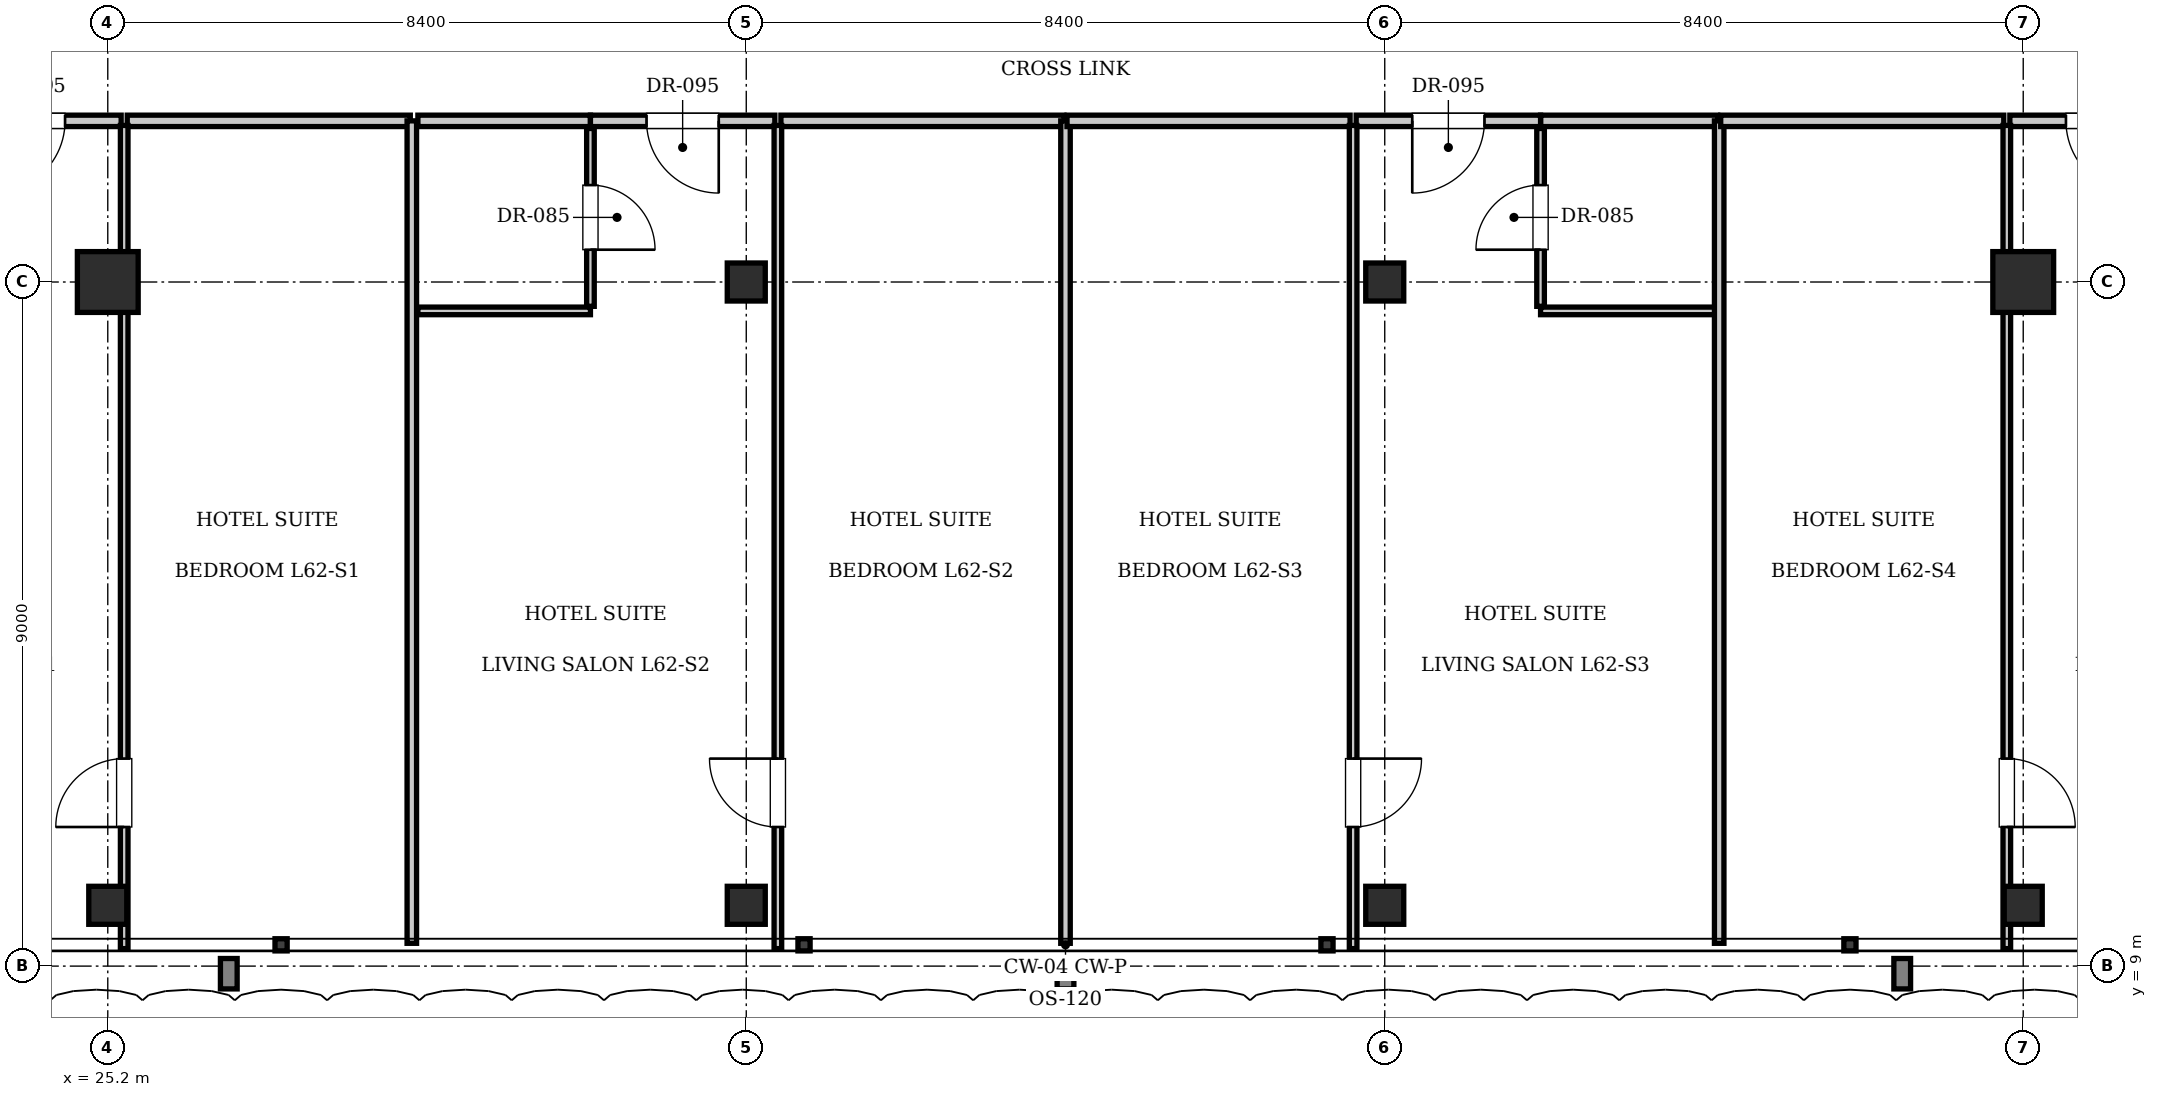
"""IFC4 building model, lengths in metres.
Left out: names, types, materials, properties, quantities, classifications, styles, units other than length and angle.
Written with IfcOpenShell. Run it as: python <this file> out.ifc"""

import sys

from ifc_helpers import new_model, si_unit, direction, frame, frame_2d, origin, origin_2d, place, context, subcontext, project, spatial, rectangle, i_section, extrude, element, fill, save


model = new_model("IFC4")
c1 = context("Model", 3, precision=1e-05, world=origin(), true_north=direction((0.0, 1.0)))
c2 = subcontext(c1, "Body", "Model", "MODEL_VIEW")
j1 = project(units=[si_unit("LENGTHUNIT", "METRE"), si_unit("PLANEANGLEUNIT", "RADIAN")], contexts=[c1])
p1 = place(None, origin())
s1 = spatial("IfcSite", under=j1, at=p1, CompositionType="ELEMENT")
p2 = place(p1, origin())
s2 = spatial("IfcBuilding", under=s1, at=p2, CompositionType="ELEMENT")
p3 = place(p2, frame((0.0, 0.0, 254.8)))
s3 = spatial("IfcBuildingStorey", under=s2, at=p3, CompositionType="ELEMENT", Elevation=254.8)
for number, where, z_axis, x_axis in (
    (1, (25.2, 18.0, 0.0), (0.0, 0.0, 1.0), (1.0, 0.0, 0.0)),
    (2, (50.4, 18.0, 0.0), (0.0, 0.0, 1.0), (1.0, 0.0, 0.0)),
):
    element("IfcColumn", number, at=place(p3, frame(where, z_axis=z_axis, x_axis=x_axis)), inside=s3, PredefinedType="COLUMN", context=c2, shape_type="SweptSolid", body=[
        extrude(rectangle(XDim=0.8, YDim=0.8, at=origin_2d()), origin(), (0.0, 0.0, 1.0), 3.85),
    ])
for number, where, z_axis, x_axis in (
    (3, (33.6, 18.0, 0.0), (0.0, 0.0, 1.0), (1.0, 0.0, 0.0)),
    (4, (42.0, 18.0, 0.0), (0.0, 0.0, 1.0), (1.0, 0.0, 0.0)),
    (5, (25.2, 9.8, 0.0), (0.0, 0.0, 1.0), (1.0, 0.0, 0.0)),
    (6, (33.6, 9.8, 0.0), (0.0, 0.0, 1.0), (1.0, 0.0, 0.0)),
    (7, (42.0, 9.8, 0.0), (0.0, 0.0, 1.0), (1.0, 0.0, 0.0)),
    (8, (50.4, 9.8, 0.0), (0.0, 0.0, 1.0), (1.0, 0.0, 0.0)),
):
    element("IfcColumn", number, at=place(p3, frame(where, z_axis=z_axis, x_axis=x_axis)), inside=s3, PredefinedType="COLUMN", context=c2, shape_type="SweptSolid", body=[
        extrude(i_section(OverallWidth=0.5, OverallDepth=0.5, WebThickness=0.022, FlangeThickness=0.032, at=origin_2d()), origin(), (0.0, 0.0, 1.0), 3.85),
    ])
p4 = place(p3, frame((22.95, 20.12, 0.0), z_axis=(0.0, 0.0, 1.0), x_axis=(1.0, 0.0, 0.0)))
e9 = element("IfcWall", 9, at=p4, inside=s3, PredefinedType="PARTITIONING", context=c2, shape_type="SweptSolid", body=[
    extrude(rectangle(XDim=2.426, YDim=0.15, at=frame_2d((1.213, 0.0))), origin(), (0.0, 0.0, 1.0), 3.61),
])
p5 = place(p4, frame((0.738, 0.0, 0.0)))
e10 = element("IfcOpeningElement", 10, at=p5, cuts=e9, PredefinedType="OPENING", context=c2, shape_type="SweptSolid", body=[
    extrude(rectangle(XDim=0.95, YDim=2.15, at=frame_2d((0.475, 1.075))), frame((0.0, 0.085, 0.0), z_axis=(0.0, -1.0, 0.0), x_axis=(1.0, 0.0, 0.0)), (0.0, 0.0, 1.0), 0.17),
])
p6 = place(p3, frame((25.456, 20.12, 0.0), z_axis=(0.0, 0.0, 1.0), x_axis=(1.0, 0.0, 0.0)))
e11 = element("IfcWall", 11, at=p6, inside=s3, PredefinedType="PARTITIONING", context=c2, shape_type="SweptSolid", body=[
    extrude(rectangle(XDim=3.724, YDim=0.15, at=frame_2d((1.862, 0.0))), origin(), (0.0, 0.0, 1.0), 3.61),
])
p7 = place(p3, frame((25.416, 9.23, 0.0), z_axis=(0.0, 0.0, 1.0), x_axis=(0.0, 1.0, 0.0)))
e12 = element("IfcWall", 12, at=p7, inside=s3, PredefinedType="PARTITIONING", context=c2, shape_type="SweptSolid", body=[
    extrude(rectangle(XDim=10.83, YDim=0.1, at=frame_2d((5.415, 0.0))), origin(), (0.0, 0.0, 1.0), 3.61),
])
p8 = place(p7, frame((1.6, 0.0, 0.0)))
e13 = element("IfcOpeningElement", 13, at=p8, cuts=e12, PredefinedType="OPENING", context=c2, shape_type="SweptSolid", body=[
    extrude(rectangle(XDim=0.9, YDim=2.1, at=frame_2d((0.45, 1.05))), frame((0.0, 0.06, 0.0), z_axis=(0.0, -1.0, 0.0), x_axis=(1.0, 0.0, 0.0)), (0.0, 0.0, 1.0), 0.12),
])
p9 = place(p3, frame((29.2, 9.3, 0.0), z_axis=(0.0, 0.0, 1.0), x_axis=(0.0, 1.0, 0.0)))
e14 = element("IfcWall", 14, at=p9, inside=s3, PredefinedType="PARTITIONING", context=c2, shape_type="SweptSolid", body=[
    extrude(rectangle(XDim=10.82, YDim=0.125, at=frame_2d((5.41, 0.0))), origin(), (0.0, 0.0, 1.0), 3.61),
])
p10 = place(p3, frame((29.28, 20.12, 0.0), z_axis=(0.0, 0.0, 1.0), x_axis=(1.0, 0.0, 0.0)))
e15 = element("IfcWall", 15, at=p10, inside=s3, PredefinedType="PARTITIONING", context=c2, shape_type="SweptSolid", body=[
    extrude(rectangle(XDim=2.27, YDim=0.15, at=frame_2d((1.135, 0.0))), origin(), (0.0, 0.0, 1.0), 3.61),
])
p11 = place(p3, frame((29.28, 17.62, 0.0), z_axis=(0.0, 0.0, 1.0), x_axis=(1.0, 0.0, 0.0)))
e16 = element("IfcWall", 16, at=p11, inside=s3, PredefinedType="PARTITIONING", context=c2, shape_type="SweptSolid", body=[
    extrude(rectangle(XDim=2.27, YDim=0.1, at=frame_2d((1.135, 0.0))), origin(), (0.0, 0.0, 1.0), 3.61),
])
p12 = place(p3, frame((31.55, 17.68, 0.0), z_axis=(0.0, 0.0, 1.0), x_axis=(0.0, 1.0, 0.0)))
e17 = element("IfcWall", 17, at=p12, inside=s3, PredefinedType="PARTITIONING", context=c2, shape_type="SweptSolid", body=[
    extrude(rectangle(XDim=2.34, YDim=0.1, at=frame_2d((1.17, 0.0))), origin(), (0.0, 0.0, 1.0), 3.61),
])
p13 = place(p12, frame((0.745, 0.0, 0.0)))
e18 = element("IfcOpeningElement", 18, at=p13, cuts=e17, PredefinedType="OPENING", context=c2, shape_type="SweptSolid", body=[
    extrude(rectangle(XDim=0.85, YDim=2.1, at=frame_2d((0.425, 1.05))), frame((0.0, 0.06, 0.0), z_axis=(0.0, -1.0, 0.0), x_axis=(1.0, 0.0, 0.0)), (0.0, 0.0, 1.0), 0.12),
])
p14 = place(p3, frame((31.55, 20.12, 0.0), z_axis=(0.0, 0.0, 1.0), x_axis=(1.0, 0.0, 0.0)))
e19 = element("IfcWall", 19, at=p14, inside=s3, PredefinedType="PARTITIONING", context=c2, shape_type="SweptSolid", body=[
    extrude(rectangle(XDim=2.426, YDim=0.15, at=frame_2d((1.213, 0.0))), origin(), (0.0, 0.0, 1.0), 3.61),
])
p15 = place(p14, frame((0.738, 0.0, 0.0)))
e20 = element("IfcOpeningElement", 20, at=p15, cuts=e19, PredefinedType="OPENING", context=c2, shape_type="SweptSolid", body=[
    extrude(rectangle(XDim=0.95, YDim=2.15, at=frame_2d((0.475, 1.075))), frame((0.0, 0.085, 0.0), z_axis=(0.0, -1.0, 0.0), x_axis=(1.0, 0.0, 0.0)), (0.0, 0.0, 1.0), 0.17),
])
p16 = place(p3, frame((34.056, 20.12, 0.0), z_axis=(0.0, 0.0, 1.0), x_axis=(1.0, 0.0, 0.0)))
e21 = element("IfcWall", 21, at=p16, inside=s3, PredefinedType="PARTITIONING", context=c2, shape_type="SweptSolid", body=[
    extrude(rectangle(XDim=3.724, YDim=0.15, at=frame_2d((1.862, 0.0))), origin(), (0.0, 0.0, 1.0), 3.61),
])
p17 = place(p3, frame((34.016, 9.23, 0.0), z_axis=(0.0, 0.0, 1.0), x_axis=(0.0, 1.0, 0.0)))
e22 = element("IfcWall", 22, at=p17, inside=s3, PredefinedType="PARTITIONING", context=c2, shape_type="SweptSolid", body=[
    extrude(rectangle(XDim=10.83, YDim=0.1, at=frame_2d((5.415, 0.0))), origin(), (0.0, 0.0, 1.0), 3.61),
])
p18 = place(p17, frame((1.6, 0.0, 0.0)))
e23 = element("IfcOpeningElement", 23, at=p18, cuts=e22, PredefinedType="OPENING", context=c2, shape_type="SweptSolid", body=[
    extrude(rectangle(XDim=0.9, YDim=2.1, at=frame_2d((0.45, 1.05))), frame((0.0, 0.06, 0.0), z_axis=(0.0, -1.0, 0.0), x_axis=(1.0, 0.0, 0.0)), (0.0, 0.0, 1.0), 0.12),
])
p19 = place(p3, frame((37.8, 9.3, 0.0), z_axis=(0.0, 0.0, 1.0), x_axis=(0.0, 1.0, 0.0)))
e24 = element("IfcWall", 24, at=p19, inside=s3, PredefinedType="PARTITIONING", context=c2, shape_type="SweptSolid", body=[
    extrude(rectangle(XDim=10.82, YDim=0.125, at=frame_2d((5.41, 0.0))), origin(), (0.0, 0.0, 1.0), 3.403),
])
p20 = place(p3, frame((44.05, 20.12, 0.0), z_axis=(0.0, 0.0, 1.0), x_axis=(1.0, 0.0, 0.0)))
e25 = element("IfcWall", 25, at=p20, inside=s3, PredefinedType="PARTITIONING", context=c2, shape_type="SweptSolid", body=[
    extrude(rectangle(XDim=2.33, YDim=0.15, at=frame_2d((1.165, 0.0))), origin(), (0.0, 0.0, 1.0), 3.61),
])
p21 = place(p3, frame((44.05, 17.62, 0.0), z_axis=(0.0, 0.0, 1.0), x_axis=(1.0, 0.0, 0.0)))
e26 = element("IfcWall", 26, at=p21, inside=s3, PredefinedType="PARTITIONING", context=c2, shape_type="SweptSolid", body=[
    extrude(rectangle(XDim=2.31, YDim=0.1, at=frame_2d((1.155, 0.0))), origin(), (0.0, 0.0, 1.0), 3.61),
])
p22 = place(p3, frame((44.05, 17.68, 0.0), z_axis=(0.0, 0.0, 1.0), x_axis=(0.0, 1.0, 0.0)))
e27 = element("IfcWall", 27, at=p22, inside=s3, PredefinedType="PARTITIONING", context=c2, shape_type="SweptSolid", body=[
    extrude(rectangle(XDim=2.34, YDim=0.1, at=frame_2d((1.17, 0.0))), origin(), (0.0, 0.0, 1.0), 3.61),
])
p23 = place(p22, frame((0.745, 0.0, 0.0)))
e28 = element("IfcOpeningElement", 28, at=p23, cuts=e27, PredefinedType="OPENING", context=c2, shape_type="SweptSolid", body=[
    extrude(rectangle(XDim=0.85, YDim=2.1, at=frame_2d((0.425, 1.05))), frame((0.0, 0.06, 0.0), z_axis=(0.0, -1.0, 0.0), x_axis=(1.0, 0.0, 0.0)), (0.0, 0.0, 1.0), 0.12),
])
p24 = place(p3, frame((37.82, 20.12, 0.0), z_axis=(0.0, 0.0, 1.0), x_axis=(1.0, 0.0, 0.0)))
e29 = element("IfcWall", 29, at=p24, inside=s3, PredefinedType="PARTITIONING", context=c2, shape_type="SweptSolid", body=[
    extrude(rectangle(XDim=3.724, YDim=0.15, at=frame_2d((1.862, 0.0))), origin(), (0.0, 0.0, 1.0), 3.61),
])
p25 = place(p3, frame((41.624, 20.12, 0.0), z_axis=(0.0, 0.0, 1.0), x_axis=(1.0, 0.0, 0.0)))
e30 = element("IfcWall", 30, at=p25, inside=s3, PredefinedType="PARTITIONING", context=c2, shape_type="SweptSolid", body=[
    extrude(rectangle(XDim=2.426, YDim=0.15, at=frame_2d((1.213, 0.0))), origin(), (0.0, 0.0, 1.0), 3.61),
])
p26 = place(p25, frame((0.738, 0.0, 0.0)))
e31 = element("IfcOpeningElement", 31, at=p26, cuts=e30, PredefinedType="OPENING", context=c2, shape_type="SweptSolid", body=[
    extrude(rectangle(XDim=0.95, YDim=2.15, at=frame_2d((0.475, 1.075))), frame((0.0, 0.085, 0.0), z_axis=(0.0, -1.0, 0.0), x_axis=(1.0, 0.0, 0.0)), (0.0, 0.0, 1.0), 0.17),
])
p27 = place(p3, frame((41.584, 9.23, 0.0), z_axis=(0.0, 0.0, 1.0), x_axis=(0.0, 1.0, 0.0)))
e32 = element("IfcWall", 32, at=p27, inside=s3, PredefinedType="PARTITIONING", context=c2, shape_type="SweptSolid", body=[
    extrude(rectangle(XDim=10.83, YDim=0.1, at=frame_2d((5.415, 0.0))), origin(), (0.0, 0.0, 1.0), 3.61),
])
p28 = place(p27, frame((1.6, 0.0, 0.0)))
e33 = element("IfcOpeningElement", 33, at=p28, cuts=e32, PredefinedType="OPENING", context=c2, shape_type="SweptSolid", body=[
    extrude(rectangle(XDim=0.9, YDim=2.1, at=frame_2d((0.45, 1.05))), frame((0.0, 0.06, 0.0), z_axis=(0.0, -1.0, 0.0), x_axis=(1.0, 0.0, 0.0)), (0.0, 0.0, 1.0), 0.12),
])
p29 = place(p3, frame((46.4, 9.3, 0.0), z_axis=(0.0, 0.0, 1.0), x_axis=(0.0, 1.0, 0.0)))
e34 = element("IfcWall", 34, at=p29, inside=s3, PredefinedType="PARTITIONING", context=c2, shape_type="SweptSolid", body=[
    extrude(rectangle(XDim=10.82, YDim=0.125, at=frame_2d((5.41, 0.0))), origin(), (0.0, 0.0, 1.0), 3.61),
])
p30 = place(p3, frame((46.42, 20.12, 0.0), z_axis=(0.0, 0.0, 1.0), x_axis=(1.0, 0.0, 0.0)))
e35 = element("IfcWall", 35, at=p30, inside=s3, PredefinedType="PARTITIONING", context=c2, shape_type="SweptSolid", body=[
    extrude(rectangle(XDim=3.724, YDim=0.15, at=frame_2d((1.862, 0.0))), origin(), (0.0, 0.0, 1.0), 3.61),
])
p31 = place(p3, frame((50.224, 20.12, 0.0), z_axis=(0.0, 0.0, 1.0), x_axis=(1.0, 0.0, 0.0)))
e36 = element("IfcWall", 36, at=p31, inside=s3, PredefinedType="PARTITIONING", context=c2, shape_type="SweptSolid", body=[
    extrude(rectangle(XDim=2.426, YDim=0.15, at=frame_2d((1.213, 0.0))), origin(), (0.0, 0.0, 1.0), 3.61),
])
p32 = place(p31, frame((0.738, 0.0, 0.0)))
e37 = element("IfcOpeningElement", 37, at=p32, cuts=e36, PredefinedType="OPENING", context=c2, shape_type="SweptSolid", body=[
    extrude(rectangle(XDim=0.95, YDim=2.15, at=frame_2d((0.475, 1.075))), frame((0.0, 0.085, 0.0), z_axis=(0.0, -1.0, 0.0), x_axis=(1.0, 0.0, 0.0)), (0.0, 0.0, 1.0), 0.17),
])
p33 = place(p3, frame((50.184, 9.23, 0.0), z_axis=(0.0, 0.0, 1.0), x_axis=(0.0, 1.0, 0.0)))
e38 = element("IfcWall", 38, at=p33, inside=s3, PredefinedType="PARTITIONING", context=c2, shape_type="SweptSolid", body=[
    extrude(rectangle(XDim=10.83, YDim=0.1, at=frame_2d((5.415, 0.0))), origin(), (0.0, 0.0, 1.0), 3.61),
])
p34 = place(p33, frame((1.6, 0.0, 0.0)))
e39 = element("IfcOpeningElement", 39, at=p34, cuts=e38, PredefinedType="OPENING", context=c2, shape_type="SweptSolid", body=[
    extrude(rectangle(XDim=0.9, YDim=2.1, at=frame_2d((0.45, 1.05))), frame((0.0, 0.06, 0.0), z_axis=(0.0, -1.0, 0.0), x_axis=(1.0, 0.0, 0.0)), (0.0, 0.0, 1.0), 0.12),
])
p35 = place(p5, frame((0.95, 0.0, 0.0), z_axis=(0.0, 0.0, 1.0), x_axis=(-1.0, 0.0, 0.0)))
e40 = element("IfcDoor", 40, at=p35, inside=s3, OperationType="SINGLE_SWING_RIGHT", PredefinedType="DOOR", context=c2, shape_type="SweptSolid", body=[
    extrude(rectangle(XDim=0.95, YDim=2.15, at=frame_2d((0.475, 1.075))), frame((0.0, 0.025, 0.0), z_axis=(0.0, -1.0, 0.0), x_axis=(1.0, 0.0, 0.0)), (0.0, 0.0, 1.0), 0.05),
])
fill(e10, e40)
p36 = place(p8, origin())
e41 = element("IfcDoor", 41, at=p36, inside=s3, OperationType="SINGLE_SWING_LEFT", PredefinedType="DOOR", context=c2, shape_type="SweptSolid", body=[
    extrude(rectangle(XDim=0.9, YDim=2.1, at=frame_2d((0.45, 1.05))), frame((0.0, 0.025, 0.0), z_axis=(0.0, -1.0, 0.0), x_axis=(1.0, 0.0, 0.0)), (0.0, 0.0, 1.0), 0.05),
])
fill(e13, e41)
p37 = place(p13, frame((0.85, 0.0, 0.0), z_axis=(0.0, 0.0, 1.0), x_axis=(-1.0, 0.0, 0.0)))
e42 = element("IfcDoor", 42, at=p37, inside=s3, OperationType="SINGLE_SWING_RIGHT", PredefinedType="DOOR", context=c2, shape_type="SweptSolid", body=[
    extrude(rectangle(XDim=0.85, YDim=2.1, at=frame_2d((0.425, 1.05))), frame((0.0, 0.025, 0.0), z_axis=(0.0, -1.0, 0.0), x_axis=(1.0, 0.0, 0.0)), (0.0, 0.0, 1.0), 0.05),
])
fill(e18, e42)
p38 = place(p15, frame((0.95, 0.0, 0.0), z_axis=(0.0, 0.0, 1.0), x_axis=(-1.0, 0.0, 0.0)))
e43 = element("IfcDoor", 43, at=p38, inside=s3, OperationType="SINGLE_SWING_LEFT", PredefinedType="DOOR", context=c2, shape_type="SweptSolid", body=[
    extrude(rectangle(XDim=0.95, YDim=2.15, at=frame_2d((0.475, 1.075))), frame((0.0, 0.025, 0.0), z_axis=(0.0, -1.0, 0.0), x_axis=(1.0, 0.0, 0.0)), (0.0, 0.0, 1.0), 0.05),
])
fill(e20, e43)
p39 = place(p18, origin())
e44 = element("IfcDoor", 44, at=p39, inside=s3, OperationType="SINGLE_SWING_RIGHT", PredefinedType="DOOR", context=c2, shape_type="SweptSolid", body=[
    extrude(rectangle(XDim=0.9, YDim=2.1, at=frame_2d((0.45, 1.05))), frame((0.0, 0.025, 0.0), z_axis=(0.0, -1.0, 0.0), x_axis=(1.0, 0.0, 0.0)), (0.0, 0.0, 1.0), 0.05),
])
fill(e23, e44)
p40 = place(p23, origin())
e45 = element("IfcDoor", 45, at=p40, inside=s3, OperationType="SINGLE_SWING_LEFT", PredefinedType="DOOR", context=c2, shape_type="SweptSolid", body=[
    extrude(rectangle(XDim=0.85, YDim=2.1, at=frame_2d((0.425, 1.05))), frame((0.0, 0.025, 0.0), z_axis=(0.0, -1.0, 0.0), x_axis=(1.0, 0.0, 0.0)), (0.0, 0.0, 1.0), 0.05),
])
fill(e28, e45)
p41 = place(p26, frame((0.95, 0.0, 0.0), z_axis=(0.0, 0.0, 1.0), x_axis=(-1.0, 0.0, 0.0)))
e46 = element("IfcDoor", 46, at=p41, inside=s3, OperationType="SINGLE_SWING_RIGHT", PredefinedType="DOOR", context=c2, shape_type="SweptSolid", body=[
    extrude(rectangle(XDim=0.95, YDim=2.15, at=frame_2d((0.475, 1.075))), frame((0.0, 0.025, 0.0), z_axis=(0.0, -1.0, 0.0), x_axis=(1.0, 0.0, 0.0)), (0.0, 0.0, 1.0), 0.05),
])
fill(e31, e46)
p42 = place(p28, frame((0.9, 0.0, 0.0), z_axis=(0.0, 0.0, 1.0), x_axis=(-1.0, 0.0, 0.0)))
e47 = element("IfcDoor", 47, at=p42, inside=s3, OperationType="SINGLE_SWING_LEFT", PredefinedType="DOOR", context=c2, shape_type="SweptSolid", body=[
    extrude(rectangle(XDim=0.9, YDim=2.1, at=frame_2d((0.45, 1.05))), frame((0.0, 0.025, 0.0), z_axis=(0.0, -1.0, 0.0), x_axis=(1.0, 0.0, 0.0)), (0.0, 0.0, 1.0), 0.05),
])
fill(e33, e47)
p43 = place(p32, frame((0.95, 0.0, 0.0), z_axis=(0.0, 0.0, 1.0), x_axis=(-1.0, 0.0, 0.0)))
e48 = element("IfcDoor", 48, at=p43, inside=s3, OperationType="SINGLE_SWING_LEFT", PredefinedType="DOOR", context=c2, shape_type="SweptSolid", body=[
    extrude(rectangle(XDim=0.95, YDim=2.15, at=frame_2d((0.475, 1.075))), frame((0.0, 0.025, 0.0), z_axis=(0.0, -1.0, 0.0), x_axis=(1.0, 0.0, 0.0)), (0.0, 0.0, 1.0), 0.05),
])
fill(e37, e48)
p44 = place(p34, frame((0.9, 0.0, 0.0), z_axis=(0.0, 0.0, 1.0), x_axis=(-1.0, 0.0, 0.0)))
e49 = element("IfcDoor", 49, at=p44, inside=s3, OperationType="SINGLE_SWING_RIGHT", PredefinedType="DOOR", context=c2, shape_type="SweptSolid", body=[
    extrude(rectangle(XDim=0.9, YDim=2.1, at=frame_2d((0.45, 1.05))), frame((0.0, 0.025, 0.0), z_axis=(0.0, -1.0, 0.0), x_axis=(1.0, 0.0, 0.0)), (0.0, 0.0, 1.0), 0.05),
])
fill(e39, e49)
save(model, sys.argv[1])
